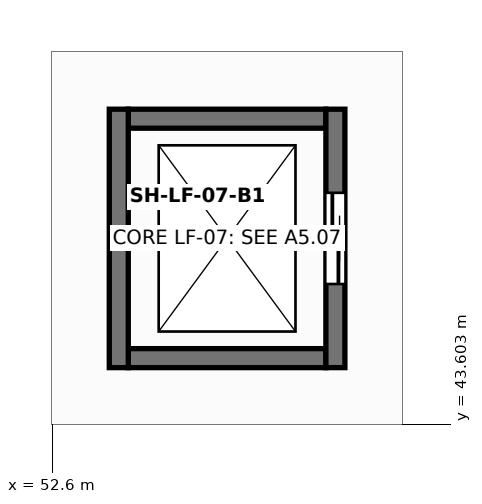
"""IFC4 building model, lengths in metres.
Left out: names, types, materials, properties, quantities, classifications, styles, units other than length and angle.
Written with IfcOpenShell. Run it as: python <this file> out.ifc"""

import sys

from ifc_helpers import new_model, si_unit, direction, frame, frame_2d, origin, place, context, subcontext, project, spatial, rectangle, extrude, element, fill, save


model = new_model("IFC4")
c1 = context("Model", 3, precision=1e-05, world=origin(), true_north=direction((0.0, 1.0)))
c2 = subcontext(c1, "Body", "Model", "MODEL_VIEW")
j1 = project(units=[si_unit("LENGTHUNIT", "METRE"), si_unit("PLANEANGLEUNIT", "RADIAN")], contexts=[c1])
p1 = place(None, origin())
s1 = spatial("IfcSite", under=j1, at=p1, CompositionType="ELEMENT")
p2 = place(p1, origin())
s2 = spatial("IfcBuilding", under=s1, at=p2, CompositionType="ELEMENT")
p3 = place(p2, frame((0.0, 0.0, -5.6)))
s3 = spatial("IfcBuildingStorey", under=s2, at=p3, CompositionType="ELEMENT", Elevation=-5.6)
for number, where, z_axis, x_axis in (
    (1, (53.6, 44.475, 0.0), (0.0, 0.0, 1.0), (1.0, 0.0, 0.0)),
    (2, (56.2, 47.625, 0.0), (0.0, 0.0, 1.0), (-1.0, 0.0, 0.0)),
):
    element("IfcWall", number, at=place(p3, frame(where, z_axis=z_axis, x_axis=x_axis)), inside=s3, PredefinedType="SOLIDWALL", context=c2, shape_type="SweptSolid", body=[
        extrude(rectangle(XDim=2.6, YDim=0.25, at=frame_2d((1.3, 0.0))), origin(), (0.0, 0.0, 1.0), 5.175),
    ])
p4 = place(p3, frame((56.325, 44.35, 0.0), z_axis=(0.0, 0.0, 1.0), x_axis=(0.0, 1.0, 0.0)))
e3 = element("IfcWall", 3, at=p4, inside=s3, PredefinedType="SOLIDWALL", context=c2, shape_type="SweptSolid", body=[
    extrude(rectangle(XDim=3.4, YDim=0.25, at=frame_2d((1.7, 0.0))), origin(), (0.0, 0.0, 1.0), 5.175),
])
p5 = place(p4, frame((1.1, 0.0, 0.0)))
e4 = element("IfcOpeningElement", 4, at=p5, cuts=e3, PredefinedType="OPENING", context=c2, shape_type="SweptSolid", body=[
    extrude(rectangle(XDim=1.2, YDim=2.2, at=frame_2d((0.6, 1.1))), frame((0.0, 0.135, 0.0), z_axis=(0.0, -1.0, 0.0), x_axis=(1.0, 0.0, 0.0)), (0.0, 0.0, 1.0), 0.27),
])
p6 = place(p3, frame((53.475, 47.75, 0.0), z_axis=(0.0, 0.0, 1.0), x_axis=(0.0, -1.0, 0.0)))
e5 = element("IfcWall", 5, at=p6, inside=s3, PredefinedType="SOLIDWALL", context=c2, shape_type="SweptSolid", body=[
    extrude(rectangle(XDim=3.4, YDim=0.25, at=frame_2d((1.7, 0.0))), origin(), (0.0, 0.0, 1.0), 5.175),
])
p7 = place(p5, frame((1.2, 0.0, 0.0), z_axis=(0.0, 0.0, 1.0), x_axis=(-1.0, 0.0, 0.0)))
e6 = element("IfcDoor", 6, at=p7, inside=s3, OperationType="DOUBLE_DOOR_SLIDING", PredefinedType="DOOR", context=c2, shape_type="SweptSolid", body=[
    extrude(rectangle(XDim=1.2, YDim=2.2, at=frame_2d((0.6, 1.1))), frame((0.0, 0.025, 0.0), z_axis=(0.0, -1.0, 0.0), x_axis=(1.0, 0.0, 0.0)), (0.0, 0.0, 1.0), 0.05),
])
fill(e4, e6)
save(model, sys.argv[1])
